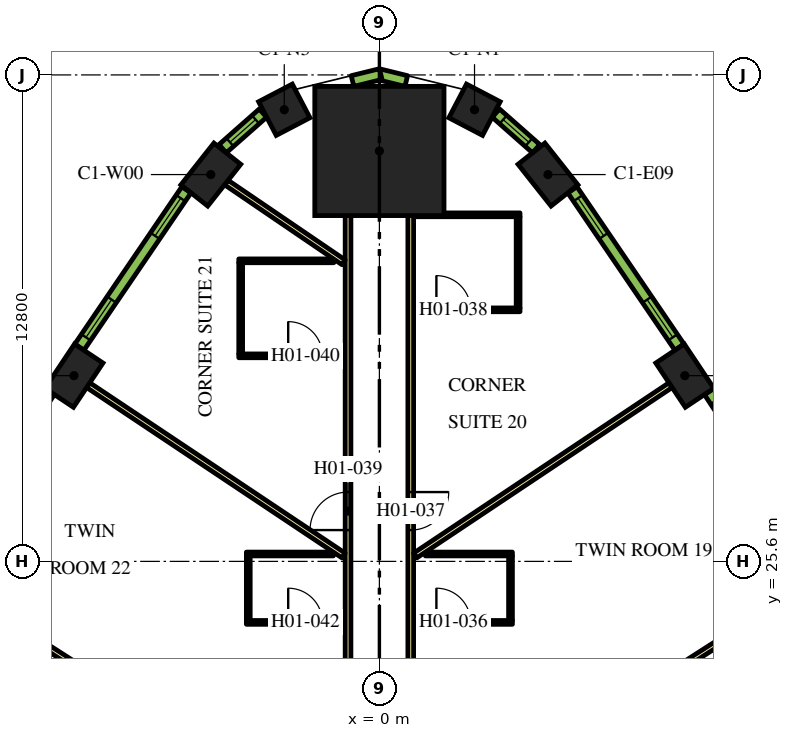
"""IFC4 building model, lengths in metres.
Left out: names, types, materials, properties, quantities, classifications, styles, units other than length and angle.
Written with IfcOpenShell. Run it as: python <this file> out.ifc"""

import sys

from ifc_helpers import new_model, si_unit, direction, frame, frame_2d, origin, origin_2d, place, context, subcontext, project, spatial, rectangle, extrude, element, fill, save


model = new_model("IFC4")
c1 = context("Model", 3, precision=1e-05, world=origin(), true_north=direction((0.0, 1.0)))
c2 = subcontext(c1, "Body", "Model", "MODEL_VIEW")
j1 = project(units=[si_unit("LENGTHUNIT", "METRE"), si_unit("PLANEANGLEUNIT", "RADIAN")], contexts=[c1])
p1 = place(None, origin())
s1 = spatial("IfcSite", under=j1, at=p1, CompositionType="ELEMENT")
p2 = place(p1, origin())
s2 = spatial("IfcBuilding", under=s1, at=p2, CompositionType="ELEMENT")
p3 = place(p2, frame((0.0, 0.0, 31.5)))
s3 = spatial("IfcBuildingStorey", under=s2, at=p3, CompositionType="ELEMENT", Elevation=31.5)
p4 = place(p3, frame((0.0, 36.399, 0.0), z_axis=(0.0, 0.0, 1.0), x_axis=(0.0, 1.0, 0.0)))
e1 = element("IfcColumn", 1, at=p4, inside=s3, PredefinedType="COLUMN", context=c2, shape_type="SweptSolid", body=[
    extrude(rectangle(XDim=3.4, YDim=3.4, at=origin_2d()), origin(), (0.0, 0.0, 1.0), 3.9),
])
for number, where, z_axis, x_axis in (
    (2, (8.037, 30.487, 0.0), (0.0, 0.0, 1.0), (-0.555, 0.832, 0.0)),
    (3, (4.436, 35.778, 0.0), (0.0, 0.0, 1.0), (-0.62, 0.784, 0.0)),
):
    element("IfcColumn", number, at=place(p3, frame(where, z_axis=z_axis, x_axis=x_axis)), inside=s3, PredefinedType="COLUMN", context=c2, shape_type="SweptSolid", body=[
        extrude(rectangle(XDim=1.4, YDim=0.9, at=origin_2d()), origin(), (0.0, 0.0, 1.0), 3.9),
    ])
for number, where, z_axis, x_axis in (
    (4, (2.503, 37.484, 0.0), (0.0, 0.0, 1.0), (-0.886, 0.464, 0.0)),
    (5, (-2.503, 37.484, 0.0), (0.0, 0.0, 1.0), (-0.886, -0.464, 0.0)),
):
    element("IfcColumn", number, at=place(p3, frame(where, z_axis=z_axis, x_axis=x_axis)), inside=s3, PredefinedType="COLUMN", context=c2, shape_type="SweptSolid", body=[
        extrude(rectangle(XDim=1.0, YDim=1.0, at=origin_2d()), origin(), (0.0, 0.0, 1.0), 3.9),
    ])
for number, where, z_axis, x_axis in (
    (6, (-4.436, 35.778, 0.0), (0.0, 0.0, 1.0), (-0.62, -0.784, 0.0)),
    (7, (-8.037, 30.487, 0.0), (0.0, 0.0, 1.0), (-0.555, -0.832, 0.0)),
):
    element("IfcColumn", number, at=place(p3, frame(where, z_axis=z_axis, x_axis=x_axis)), inside=s3, PredefinedType="COLUMN", context=c2, shape_type="SweptSolid", body=[
        extrude(rectangle(XDim=1.4, YDim=0.9, at=origin_2d()), origin(), (0.0, 0.0, 1.0), 3.9),
    ])
p5 = place(p3, frame((0.825, 34.699, 0.0), z_axis=(0.0, 0.0, 1.0), x_axis=(0.0, -1.0, 0.0)))
e8 = element("IfcWall", 8, at=p5, inside=s3, PredefinedType="PARTITIONING", context=c2, shape_type="SweptSolid", body=[
    extrude(rectangle(XDim=16.144, YDim=0.15, at=frame_2d((8.072, 0.0))), origin(), (0.0, 0.0, 1.0), 2.75),
])
p6 = place(p5, frame((14.714, 0.0, 0.0)))
e9 = element("IfcOpeningElement", 9, at=p6, cuts=e8, PredefinedType="OPENING", context=c2, shape_type="SweptSolid", body=[
    extrude(rectangle(XDim=1.0, YDim=2.1, at=frame_2d((0.5, 1.05))), frame((0.0, 0.085, 0.0), z_axis=(0.0, -1.0, 0.0), x_axis=(1.0, 0.0, 0.0)), (0.0, 0.0, 1.0), 0.17),
])
p7 = place(p5, frame((7.275, 0.0, 0.0)))
e10 = element("IfcOpeningElement", 10, at=p7, cuts=e8, PredefinedType="OPENING", context=c2, shape_type="SweptSolid", body=[
    extrude(rectangle(XDim=1.0, YDim=2.1, at=frame_2d((0.5, 1.05))), frame((0.0, 0.085, 0.0), z_axis=(0.0, -1.0, 0.0), x_axis=(1.0, 0.0, 0.0)), (0.0, 0.0, 1.0), 0.17),
])
p8 = place(p3, frame((-0.825, 18.475, 0.0), z_axis=(0.0, 0.0, 1.0), x_axis=(0.0, 1.0, 0.0)))
e11 = element("IfcWall", 11, at=p8, inside=s3, PredefinedType="PARTITIONING", context=c2, shape_type="SweptSolid", body=[
    extrude(rectangle(XDim=16.224, YDim=0.15, at=frame_2d((8.112, 0.0))), origin(), (0.0, 0.0, 1.0), 2.75),
])
p9 = place(p8, frame((7.949, 0.0, 0.0)))
e12 = element("IfcOpeningElement", 12, at=p9, cuts=e11, PredefinedType="OPENING", context=c2, shape_type="SweptSolid", body=[
    extrude(rectangle(XDim=1.0, YDim=2.1, at=frame_2d((0.5, 1.05))), frame((0.0, 0.085, 0.0), z_axis=(0.0, -1.0, 0.0), x_axis=(1.0, 0.0, 0.0)), (0.0, 0.0, 1.0), 0.17),
])
p10 = place(p8, frame((0.526, 0.0, 0.0)))
e13 = element("IfcOpeningElement", 13, at=p10, cuts=e11, PredefinedType="OPENING", context=c2, shape_type="SweptSolid", body=[
    extrude(rectangle(XDim=1.0, YDim=2.1, at=frame_2d((0.5, 1.05))), frame((0.0, 0.085, 0.0), z_axis=(0.0, -1.0, 0.0), x_axis=(1.0, 0.0, 0.0)), (0.0, 0.0, 1.0), 0.17),
])
p11 = place(p3, frame((-11.16, 24.888, 0.0), z_axis=(0.0, 0.0, 1.0), x_axis=(0.84199813156, -0.539480441211, 0.0)))
e14 = element("IfcWall", 14, at=p11, inside=s3, PredefinedType="PARTITIONING", context=c2, shape_type="SweptSolid", body=[
    extrude(rectangle(XDim=11.638, YDim=0.15, at=frame_2d((5.819, 0.0))), origin(), (0.0, 0.0, 1.0), 2.75),
])
p12 = place(p3, frame((-7.662, 30.238, 0.0), z_axis=(0.0, 0.0, 1.0), x_axis=(0.831882886825, -0.554951225431, 0.0)))
e15 = element("IfcWall", 15, at=p12, inside=s3, PredefinedType="PARTITIONING", context=c2, shape_type="SweptSolid", body=[
    extrude(rectangle(XDim=8.079, YDim=0.15, at=frame_2d((4.04, 0.0))), origin(), (0.0, 0.0, 1.0), 2.75),
])
p13 = place(p3, frame((-4.028, 35.569, 0.0), z_axis=(0.0, 0.0, 1.0), x_axis=(0.826730622998, -0.562597971021, 0.0)))
e16 = element("IfcWall", 16, at=p13, inside=s3, PredefinedType="PARTITIONING", context=c2, shape_type="SweptSolid", body=[
    extrude(rectangle(XDim=3.733, YDim=0.15, at=frame_2d((1.867, 0.0))), origin(), (0.0, 0.0, 1.0), 2.75),
])
p14 = place(p3, frame((7.662, 30.238, 0.0), z_axis=(0.0, 0.0, 1.0), x_axis=(-0.831882886825, -0.554951225431, 0.0)))
e17 = element("IfcWall", 17, at=p14, inside=s3, PredefinedType="PARTITIONING", context=c2, shape_type="SweptSolid", body=[
    extrude(rectangle(XDim=8.079, YDim=0.15, at=frame_2d((4.04, 0.0))), origin(), (0.0, 0.0, 1.0), 2.75),
])
p15 = place(p3, frame((11.16, 24.888, 0.0), z_axis=(0.0, 0.0, 1.0), x_axis=(-0.84199813156, -0.539480441211, 0.0)))
e18 = element("IfcWall", 18, at=p15, inside=s3, PredefinedType="PARTITIONING", context=c2, shape_type="SweptSolid", body=[
    extrude(rectangle(XDim=11.638, YDim=0.15, at=frame_2d((5.819, 0.0))), origin(), (0.0, 0.0, 1.0), 2.75),
])
p16 = place(p3, frame((0.9, 23.994, 0.0), z_axis=(0.0, 0.0, 1.0), x_axis=(1.0, 0.0, 0.0)))
e19 = element("IfcWall", 19, at=p16, inside=s3, PredefinedType="PARTITIONING", context=c2, shape_type="SweptSolid", body=[
    extrude(rectangle(XDim=2.6, YDim=0.1, at=frame_2d((1.3, 0.0))), origin(), (0.0, 0.0, 1.0), 2.75),
])
p17 = place(p16, frame((0.6, 0.0, 0.0)))
e20 = element("IfcOpeningElement", 20, at=p17, cuts=e19, PredefinedType="OPENING", context=c2, shape_type="SweptSolid", body=[
    extrude(rectangle(XDim=0.9, YDim=2.1, at=frame_2d((0.45, 1.05))), frame((0.0, 0.06, 0.0), z_axis=(0.0, -1.0, 0.0), x_axis=(1.0, 0.0, 0.0)), (0.0, 0.0, 1.0), 0.12),
])
p18 = place(p3, frame((3.45, 24.044, 0.0), z_axis=(0.0, 0.0, 1.0), x_axis=(0.0, 1.0, 0.0)))
e21 = element("IfcWall", 21, at=p18, inside=s3, PredefinedType="PARTITIONING", context=c2, shape_type="SweptSolid", body=[
    extrude(rectangle(XDim=1.7, YDim=0.1, at=frame_2d((0.85, 0.0))), origin(), (0.0, 0.0, 1.0), 2.75),
])
p19 = place(p3, frame((1.21, 25.794, 0.0), z_axis=(0.0, 0.0, 1.0), x_axis=(1.0, 0.0, 0.0)))
e22 = element("IfcWall", 22, at=p19, inside=s3, PredefinedType="PARTITIONING", context=c2, shape_type="SweptSolid", body=[
    extrude(rectangle(XDim=2.29, YDim=0.1, at=frame_2d((1.145, 0.0))), origin(), (0.0, 0.0, 1.0), 2.75),
])
p20 = place(p3, frame((0.9, 32.219, 0.0), z_axis=(0.0, 0.0, 1.0), x_axis=(1.0, 0.0, 0.0)))
e23 = element("IfcWall", 23, at=p20, inside=s3, PredefinedType="PARTITIONING", context=c2, shape_type="SweptSolid", body=[
    extrude(rectangle(XDim=2.8, YDim=0.1, at=frame_2d((1.4, 0.0))), origin(), (0.0, 0.0, 1.0), 2.75),
])
p21 = place(p20, frame((0.6, 0.0, 0.0)))
e24 = element("IfcOpeningElement", 24, at=p21, cuts=e23, PredefinedType="OPENING", context=c2, shape_type="SweptSolid", body=[
    extrude(rectangle(XDim=0.9, YDim=2.1, at=frame_2d((0.45, 1.05))), frame((0.0, 0.06, 0.0), z_axis=(0.0, -1.0, 0.0), x_axis=(1.0, 0.0, 0.0)), (0.0, 0.0, 1.0), 0.12),
])
p22 = place(p3, frame((3.65, 32.269, 0.0), z_axis=(0.0, 0.0, 1.0), x_axis=(0.0, 1.0, 0.0)))
e25 = element("IfcWall", 25, at=p22, inside=s3, PredefinedType="PARTITIONING", context=c2, shape_type="SweptSolid", body=[
    extrude(rectangle(XDim=2.4, YDim=0.1, at=frame_2d((1.2, 0.0))), origin(), (0.0, 0.0, 1.0), 2.75),
])
p23 = place(p3, frame((0.9, 34.719, 0.0), z_axis=(0.0, 0.0, 1.0), x_axis=(1.0, 0.0, 0.0)))
e26 = element("IfcWall", 26, at=p23, inside=s3, PredefinedType="PARTITIONING", context=c2, shape_type="SweptSolid", body=[
    extrude(rectangle(XDim=2.8, YDim=0.1, at=frame_2d((1.4, 0.0))), origin(), (0.0, 0.0, 1.0), 2.75),
])
p24 = place(p3, frame((-3.7, 31.009, 0.0), z_axis=(0.0, 0.0, 1.0), x_axis=(1.0, 0.0, 0.0)))
e27 = element("IfcWall", 27, at=p24, inside=s3, PredefinedType="PARTITIONING", context=c2, shape_type="SweptSolid", body=[
    extrude(rectangle(XDim=2.8, YDim=0.1, at=frame_2d((1.4, 0.0))), origin(), (0.0, 0.0, 1.0), 2.75),
])
p25 = place(p24, frame((1.3, 0.0, 0.0)))
e28 = element("IfcOpeningElement", 28, at=p25, cuts=e27, PredefinedType="OPENING", context=c2, shape_type="SweptSolid", body=[
    extrude(rectangle(XDim=0.9, YDim=2.1, at=frame_2d((0.45, 1.05))), frame((0.0, 0.06, 0.0), z_axis=(0.0, -1.0, 0.0), x_axis=(1.0, 0.0, 0.0)), (0.0, 0.0, 1.0), 0.12),
])
p26 = place(p3, frame((-3.65, 31.059, 0.0), z_axis=(0.0, 0.0, 1.0), x_axis=(0.0, 1.0, 0.0)))
e29 = element("IfcWall", 29, at=p26, inside=s3, PredefinedType="PARTITIONING", context=c2, shape_type="SweptSolid", body=[
    extrude(rectangle(XDim=2.4, YDim=0.1, at=frame_2d((1.2, 0.0))), origin(), (0.0, 0.0, 1.0), 2.75),
])
p27 = place(p3, frame((-1.2, 33.509, 0.0), z_axis=(0.0, 0.0, 1.0), x_axis=(-1.0, 0.0, 0.0)))
e30 = element("IfcWall", 30, at=p27, inside=s3, PredefinedType="PARTITIONING", context=c2, shape_type="SweptSolid", body=[
    extrude(rectangle(XDim=2.5, YDim=0.1, at=frame_2d((1.25, 0.0))), origin(), (0.0, 0.0, 1.0), 2.75),
])
p28 = place(p3, frame((-3.5, 23.995, 0.0), z_axis=(0.0, 0.0, 1.0), x_axis=(1.0, 0.0, 0.0)))
e31 = element("IfcWall", 31, at=p28, inside=s3, PredefinedType="PARTITIONING", context=c2, shape_type="SweptSolid", body=[
    extrude(rectangle(XDim=2.6, YDim=0.1, at=frame_2d((1.3, 0.0))), origin(), (0.0, 0.0, 1.0), 2.75),
])
p29 = place(p28, frame((1.1, 0.0, 0.0)))
e32 = element("IfcOpeningElement", 32, at=p29, cuts=e31, PredefinedType="OPENING", context=c2, shape_type="SweptSolid", body=[
    extrude(rectangle(XDim=0.9, YDim=2.1, at=frame_2d((0.45, 1.05))), frame((0.0, 0.06, 0.0), z_axis=(0.0, -1.0, 0.0), x_axis=(1.0, 0.0, 0.0)), (0.0, 0.0, 1.0), 0.12),
])
p30 = place(p3, frame((-3.45, 24.045, 0.0), z_axis=(0.0, 0.0, 1.0), x_axis=(0.0, 1.0, 0.0)))
e33 = element("IfcWall", 33, at=p30, inside=s3, PredefinedType="PARTITIONING", context=c2, shape_type="SweptSolid", body=[
    extrude(rectangle(XDim=1.7, YDim=0.1, at=frame_2d((0.85, 0.0))), origin(), (0.0, 0.0, 1.0), 2.75),
])
p31 = place(p3, frame((-1.21, 25.795, 0.0), z_axis=(0.0, 0.0, 1.0), x_axis=(-1.0, 0.0, 0.0)))
e34 = element("IfcWall", 34, at=p31, inside=s3, PredefinedType="PARTITIONING", context=c2, shape_type="SweptSolid", body=[
    extrude(rectangle(XDim=2.29, YDim=0.1, at=frame_2d((1.145, 0.0))), origin(), (0.0, 0.0, 1.0), 2.75),
])
p32 = place(p3, frame((11.411, 25.884, 0.0), z_axis=(0.0, 0.0, 1.0), x_axis=(-0.547204617628, 0.836998868845, 0.0)))
e35 = element("IfcWall", 35, at=p32, inside=s3, PredefinedType="SOLIDWALL", context=c2, shape_type="SweptSolid", body=[
    extrude(rectangle(XDim=4.998, YDim=0.29, at=frame_2d((2.499, 0.0))), origin(), (0.0, 0.0, 1.0), 3.65),
])
p33 = place(p32, frame((0.297, 0.0, 0.9)))
e36 = element("IfcOpeningElement", 36, at=p33, cuts=e35, PredefinedType="OPENING", context=c2, shape_type="SweptSolid", body=[
    extrude(rectangle(XDim=1.2, YDim=2.15, at=frame_2d((0.6, 1.075))), frame((0.0, 0.155, 0.0), z_axis=(0.0, -1.0, 0.0), x_axis=(1.0, 0.0, 0.0)), (0.0, 0.0, 1.0), 0.31),
])
p34 = place(p32, frame((3.501, 0.0, 0.9)))
e37 = element("IfcOpeningElement", 37, at=p34, cuts=e35, PredefinedType="OPENING", context=c2, shape_type="SweptSolid", body=[
    extrude(rectangle(XDim=1.2, YDim=2.15, at=frame_2d((0.6, 1.075))), frame((0.0, 0.155, 0.0), z_axis=(0.0, -1.0, 0.0), x_axis=(1.0, 0.0, 0.0)), (0.0, 0.0, 1.0), 0.31),
])
p35 = place(p3, frame((7.895, 31.238, 0.0), z_axis=(0.0, 0.0, 1.0), x_axis=(-0.562610153679, 0.826722332454, 0.0)))
e38 = element("IfcWall", 38, at=p35, inside=s3, PredefinedType="SOLIDWALL", context=c2, shape_type="SweptSolid", body=[
    extrude(rectangle(XDim=5.006, YDim=0.29, at=frame_2d((2.503, 0.0))), origin(), (0.0, 0.0, 1.0), 3.65),
])
p36 = place(p35, frame((0.31, 0.0, 0.9)))
e39 = element("IfcOpeningElement", 39, at=p36, cuts=e38, PredefinedType="OPENING", context=c2, shape_type="SweptSolid", body=[
    extrude(rectangle(XDim=1.2, YDim=2.15, at=frame_2d((0.6, 1.075))), frame((0.0, 0.155, 0.0), z_axis=(0.0, -1.0, 0.0), x_axis=(1.0, 0.0, 0.0)), (0.0, 0.0, 1.0), 0.31),
])
p37 = place(p35, frame((3.541, 0.0, 0.9)))
e40 = element("IfcOpeningElement", 40, at=p37, cuts=e38, PredefinedType="OPENING", context=c2, shape_type="SweptSolid", body=[
    extrude(rectangle(XDim=1.2, YDim=2.15, at=frame_2d((0.6, 1.075))), frame((0.0, 0.155, 0.0), z_axis=(0.0, -1.0, 0.0), x_axis=(1.0, 0.0, 0.0)), (0.0, 0.0, 1.0), 0.31),
])
p38 = place(p3, frame((4.125, 36.459, 0.0), z_axis=(0.0, 0.0, 1.0), x_axis=(-0.749812680302, 0.661650167731, 0.0)))
e41 = element("IfcWall", 41, at=p38, inside=s3, PredefinedType="SOLIDWALL", context=c2, shape_type="SweptSolid", body=[
    extrude(rectangle(XDim=1.415, YDim=0.29, at=frame_2d((0.708, 0.0))), origin(), (0.0, 0.0, 1.0), 3.65),
])
p39 = place(p38, frame((0.258, 0.0, 0.9)))
e42 = element("IfcOpeningElement", 42, at=p39, cuts=e41, PredefinedType="OPENING", context=c2, shape_type="SweptSolid", body=[
    extrude(rectangle(XDim=0.9, YDim=2.15, at=frame_2d((0.45, 1.075))), frame((0.0, 0.155, 0.0), z_axis=(0.0, -1.0, 0.0), x_axis=(1.0, 0.0, 0.0)), (0.0, 0.0, 1.0), 0.31),
])
for number, where, z_axis, x_axis in (
    (43, (0.707, 38.239, 0.0), (0.0, 0.0, 1.0), (-0.971, 0.238, 0.0)),
    (44, (0.035, 38.421, 0.0), (0.0, 0.0, 1.0), (-0.971, -0.238, 0.0)),
):
    element("IfcWall", number, at=place(p3, frame(where, z_axis=z_axis, x_axis=x_axis)), inside=s3, PredefinedType="SOLIDWALL", context=c2, shape_type="SweptSolid", body=[
        extrude(rectangle(XDim=0.764, YDim=0.29, at=frame_2d((0.382, 0.0))), origin(), (0.0, 0.0, 1.0), 3.65),
    ])
p40 = place(p3, frame((-3.064, 37.395, 0.0), z_axis=(0.0, 0.0, 1.0), x_axis=(-0.749812680302, -0.661650167731, 0.0)))
e45 = element("IfcWall", 45, at=p40, inside=s3, PredefinedType="SOLIDWALL", context=c2, shape_type="SweptSolid", body=[
    extrude(rectangle(XDim=1.415, YDim=0.29, at=frame_2d((0.708, 0.0))), origin(), (0.0, 0.0, 1.0), 3.65),
])
p41 = place(p40, frame((0.258, 0.0, 0.9)))
e46 = element("IfcOpeningElement", 46, at=p41, cuts=e45, PredefinedType="OPENING", context=c2, shape_type="SweptSolid", body=[
    extrude(rectangle(XDim=0.9, YDim=2.15, at=frame_2d((0.45, 1.075))), frame((0.0, 0.155, 0.0), z_axis=(0.0, -1.0, 0.0), x_axis=(1.0, 0.0, 0.0)), (0.0, 0.0, 1.0), 0.31),
])
p42 = place(p3, frame((-5.078, 35.376, 0.0), z_axis=(0.0, 0.0, 1.0), x_axis=(-0.562610153679, -0.826722332454, 0.0)))
e47 = element("IfcWall", 47, at=p42, inside=s3, PredefinedType="SOLIDWALL", context=c2, shape_type="SweptSolid", body=[
    extrude(rectangle(XDim=5.006, YDim=0.29, at=frame_2d((2.503, 0.0))), origin(), (0.0, 0.0, 1.0), 3.65),
])
p43 = place(p42, frame((0.265, 0.0, 0.9)))
e48 = element("IfcOpeningElement", 48, at=p43, cuts=e47, PredefinedType="OPENING", context=c2, shape_type="SweptSolid", body=[
    extrude(rectangle(XDim=1.2, YDim=2.15, at=frame_2d((0.6, 1.075))), frame((0.0, 0.155, 0.0), z_axis=(0.0, -1.0, 0.0), x_axis=(1.0, 0.0, 0.0)), (0.0, 0.0, 1.0), 0.31),
])
p44 = place(p42, frame((3.495, 0.0, 0.9)))
e49 = element("IfcOpeningElement", 49, at=p44, cuts=e47, PredefinedType="OPENING", context=c2, shape_type="SweptSolid", body=[
    extrude(rectangle(XDim=1.2, YDim=2.15, at=frame_2d((0.6, 1.075))), frame((0.0, 0.155, 0.0), z_axis=(0.0, -1.0, 0.0), x_axis=(1.0, 0.0, 0.0)), (0.0, 0.0, 1.0), 0.31),
])
p45 = place(p3, frame((-8.676, 30.068, 0.0), z_axis=(0.0, 0.0, 1.0), x_axis=(-0.547204617628, -0.836998868845, 0.0)))
e50 = element("IfcWall", 50, at=p45, inside=s3, PredefinedType="SOLIDWALL", context=c2, shape_type="SweptSolid", body=[
    extrude(rectangle(XDim=4.998, YDim=0.29, at=frame_2d((2.499, 0.0))), origin(), (0.0, 0.0, 1.0), 3.65),
])
p46 = place(p45, frame((0.297, 0.0, 0.9)))
e51 = element("IfcOpeningElement", 51, at=p46, cuts=e50, PredefinedType="OPENING", context=c2, shape_type="SweptSolid", body=[
    extrude(rectangle(XDim=1.2, YDim=2.15, at=frame_2d((0.6, 1.075))), frame((0.0, 0.155, 0.0), z_axis=(0.0, -1.0, 0.0), x_axis=(1.0, 0.0, 0.0)), (0.0, 0.0, 1.0), 0.31),
])
p47 = place(p45, frame((3.501, 0.0, 0.9)))
e52 = element("IfcOpeningElement", 52, at=p47, cuts=e50, PredefinedType="OPENING", context=c2, shape_type="SweptSolid", body=[
    extrude(rectangle(XDim=1.2, YDim=2.15, at=frame_2d((0.6, 1.075))), frame((0.0, 0.155, 0.0), z_axis=(0.0, -1.0, 0.0), x_axis=(1.0, 0.0, 0.0)), (0.0, 0.0, 1.0), 0.31),
])
p48 = place(p17, origin())
e53 = element("IfcDoor", 53, at=p48, inside=s3, OperationType="SINGLE_SWING_LEFT", PredefinedType="DOOR", context=c2, shape_type="SweptSolid", body=[
    extrude(rectangle(XDim=0.9, YDim=2.1, at=frame_2d((0.45, 1.05))), frame((0.0, 0.025, 0.0), z_axis=(0.0, -1.0, 0.0), x_axis=(1.0, 0.0, 0.0)), (0.0, 0.0, 1.0), 0.05),
])
fill(e20, e53)
p49 = place(p7, origin())
e54 = element("IfcDoor", 54, at=p49, inside=s3, OperationType="SINGLE_SWING_RIGHT", PredefinedType="DOOR", context=c2, shape_type="SweptSolid", body=[
    extrude(rectangle(XDim=1.0, YDim=2.1, at=frame_2d((0.5, 1.05))), frame((0.0, 0.025, 0.0), z_axis=(0.0, -1.0, 0.0), x_axis=(1.0, 0.0, 0.0)), (0.0, 0.0, 1.0), 0.05),
])
fill(e10, e54)
p50 = place(p21, origin())
e55 = element("IfcDoor", 55, at=p50, inside=s3, OperationType="SINGLE_SWING_LEFT", PredefinedType="DOOR", context=c2, shape_type="SweptSolid", body=[
    extrude(rectangle(XDim=0.9, YDim=2.1, at=frame_2d((0.45, 1.05))), frame((0.0, 0.025, 0.0), z_axis=(0.0, -1.0, 0.0), x_axis=(1.0, 0.0, 0.0)), (0.0, 0.0, 1.0), 0.05),
])
fill(e24, e55)
p51 = place(p9, origin())
e56 = element("IfcDoor", 56, at=p51, inside=s3, OperationType="SINGLE_SWING_LEFT", PredefinedType="DOOR", context=c2, shape_type="SweptSolid", body=[
    extrude(rectangle(XDim=1.0, YDim=2.1, at=frame_2d((0.5, 1.05))), frame((0.0, 0.025, 0.0), z_axis=(0.0, -1.0, 0.0), x_axis=(1.0, 0.0, 0.0)), (0.0, 0.0, 1.0), 0.05),
])
fill(e12, e56)
p52 = place(p25, origin())
e57 = element("IfcDoor", 57, at=p52, inside=s3, OperationType="SINGLE_SWING_RIGHT", PredefinedType="DOOR", context=c2, shape_type="SweptSolid", body=[
    extrude(rectangle(XDim=0.9, YDim=2.1, at=frame_2d((0.45, 1.05))), frame((0.0, 0.025, 0.0), z_axis=(0.0, -1.0, 0.0), x_axis=(1.0, 0.0, 0.0)), (0.0, 0.0, 1.0), 0.05),
])
fill(e28, e57)
p53 = place(p29, origin())
e58 = element("IfcDoor", 58, at=p53, inside=s3, OperationType="SINGLE_SWING_LEFT", PredefinedType="DOOR", context=c2, shape_type="SweptSolid", body=[
    extrude(rectangle(XDim=0.9, YDim=2.1, at=frame_2d((0.45, 1.05))), frame((0.0, 0.025, 0.0), z_axis=(0.0, -1.0, 0.0), x_axis=(1.0, 0.0, 0.0)), (0.0, 0.0, 1.0), 0.05),
])
fill(e32, e58)
p54 = place(p36, origin())
e59 = element("IfcWindow", 59, at=p54, inside=s3, PartitioningType="DOUBLE_PANEL_VERTICAL", PredefinedType="WINDOW", context=c2, shape_type="SweptSolid", body=[
    extrude(rectangle(XDim=1.2, YDim=2.15, at=frame_2d((0.6, 1.075))), frame((0.0, 0.015, 0.0), z_axis=(0.0, -1.0, 0.0), x_axis=(1.0, 0.0, 0.0)), (0.0, 0.0, 1.0), 0.06),
])
fill(e39, e59)
p55 = place(p37, origin())
e60 = element("IfcWindow", 60, at=p55, inside=s3, PartitioningType="DOUBLE_PANEL_VERTICAL", PredefinedType="WINDOW", context=c2, shape_type="SweptSolid", body=[
    extrude(rectangle(XDim=1.2, YDim=2.15, at=frame_2d((0.6, 1.075))), frame((0.0, 0.015, 0.0), z_axis=(0.0, -1.0, 0.0), x_axis=(1.0, 0.0, 0.0)), (0.0, 0.0, 1.0), 0.06),
])
fill(e40, e60)
p56 = place(p39, origin())
e61 = element("IfcWindow", 61, at=p56, inside=s3, PartitioningType="SINGLE_PANEL", PredefinedType="WINDOW", context=c2, shape_type="SweptSolid", body=[
    extrude(rectangle(XDim=0.9, YDim=2.15, at=frame_2d((0.45, 1.075))), frame((0.0, 0.015, 0.0), z_axis=(0.0, -1.0, 0.0), x_axis=(1.0, 0.0, 0.0)), (0.0, 0.0, 1.0), 0.06),
])
fill(e42, e61)
p57 = place(p41, origin())
e62 = element("IfcWindow", 62, at=p57, inside=s3, PartitioningType="SINGLE_PANEL", PredefinedType="WINDOW", context=c2, shape_type="SweptSolid", body=[
    extrude(rectangle(XDim=0.9, YDim=2.15, at=frame_2d((0.45, 1.075))), frame((0.0, 0.015, 0.0), z_axis=(0.0, -1.0, 0.0), x_axis=(1.0, 0.0, 0.0)), (0.0, 0.0, 1.0), 0.06),
])
fill(e46, e62)
p58 = place(p43, origin())
e63 = element("IfcWindow", 63, at=p58, inside=s3, PartitioningType="DOUBLE_PANEL_VERTICAL", PredefinedType="WINDOW", context=c2, shape_type="SweptSolid", body=[
    extrude(rectangle(XDim=1.2, YDim=2.15, at=frame_2d((0.6, 1.075))), frame((0.0, 0.015, 0.0), z_axis=(0.0, -1.0, 0.0), x_axis=(1.0, 0.0, 0.0)), (0.0, 0.0, 1.0), 0.06),
])
fill(e48, e63)
p59 = place(p44, origin())
e64 = element("IfcWindow", 64, at=p59, inside=s3, PartitioningType="DOUBLE_PANEL_VERTICAL", PredefinedType="WINDOW", context=c2, shape_type="SweptSolid", body=[
    extrude(rectangle(XDim=1.2, YDim=2.15, at=frame_2d((0.6, 1.075))), frame((0.0, 0.015, 0.0), z_axis=(0.0, -1.0, 0.0), x_axis=(1.0, 0.0, 0.0)), (0.0, 0.0, 1.0), 0.06),
])
fill(e49, e64)
save(model, sys.argv[1])
